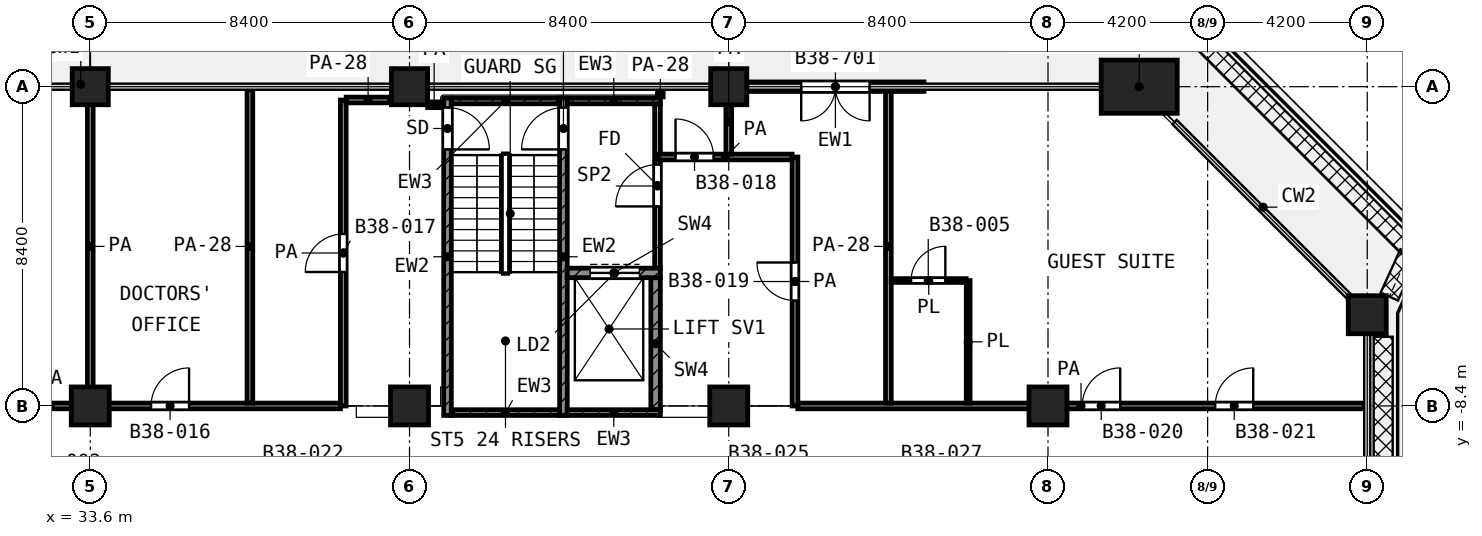
"""IFC4 building model, lengths in metres.
Left out: names, types, materials, properties, quantities, classifications, styles, units other than length and angle.
Written with IfcOpenShell. Run it as: python <this file> out.ifc"""

import sys

from ifc_helpers import new_model, si_unit, direction, frame, frame_2d, origin, origin_2d, place, context, subcontext, project, spatial, rectangle, extrude, element, fill, save


model = new_model("IFC4")
c1 = context("Model", 3, precision=1e-05, world=origin(), true_north=direction((0.0, 1.0)))
c2 = subcontext(c1, "Body", "Model", "MODEL_VIEW")
j1 = project(units=[si_unit("LENGTHUNIT", "METRE"), si_unit("PLANEANGLEUNIT", "RADIAN")], contexts=[c1])
p1 = place(None, origin())
s1 = spatial("IfcSite", under=j1, at=p1, CompositionType="ELEMENT")
p2 = place(p1, origin())
s2 = spatial("IfcBuilding", under=s1, at=p2, CompositionType="ELEMENT")
p3 = place(p2, frame((0.0, 0.0, 166.8)))
s3 = spatial("IfcBuildingStorey", under=s2, at=p3, CompositionType="ELEMENT", Elevation=166.8)
for number, where, z_axis, x_axis in (
    (1, (33.6, 0.0, 0.0), (0.0, 0.0, 1.0), (1.0, 0.0, 0.0)),
    (2, (42.0, 0.0, 0.0), (0.0, 0.0, 1.0), (1.0, 0.0, 0.0)),
    (3, (50.4, 0.0, 0.0), (0.0, 0.0, 1.0), (1.0, 0.0, 0.0)),
):
    element("IfcColumn", number, at=place(p3, frame(where, z_axis=z_axis, x_axis=x_axis)), inside=s3, PredefinedType="COLUMN", context=c2, shape_type="SweptSolid", body=[
        extrude(rectangle(XDim=0.95, YDim=0.95, at=origin_2d()), origin(), (0.0, 0.0, 1.0), 4.2),
    ])
p4 = place(p3, frame((61.2, 0.0, 0.0), z_axis=(0.0, 0.0, 1.0), x_axis=(1.0, 0.0, 0.0)))
e4 = element("IfcColumn", 4, at=p4, inside=s3, PredefinedType="COLUMN", context=c2, shape_type="SweptSolid", body=[
    extrude(rectangle(XDim=2.0, YDim=1.4, at=origin_2d()), origin(), (0.0, 0.0, 1.0), 4.2),
])
for number, where, z_axis, x_axis in (
    (5, (67.2, -6.0, 0.0), (0.0, 0.0, 1.0), (1.0, 0.0, 0.0)),
    (6, (33.6, -8.4, 0.0), (0.0, 0.0, 1.0), (1.0, 0.0, 0.0)),
    (7, (42.0, -8.4, 0.0), (0.0, 0.0, 1.0), (1.0, 0.0, 0.0)),
    (8, (50.4, -8.4, 0.0), (0.0, 0.0, 1.0), (1.0, 0.0, 0.0)),
    (9, (58.8, -8.4, 0.0), (0.0, 0.0, 1.0), (1.0, 0.0, 0.0)),
):
    element("IfcColumn", number, at=place(p3, frame(where, z_axis=z_axis, x_axis=x_axis)), inside=s3, PredefinedType="COLUMN", context=c2, shape_type="SweptSolid", body=[
        extrude(rectangle(XDim=1.0, YDim=1.0, at=origin_2d()), origin(), (0.0, 0.0, 1.0), 4.2),
    ])
p5 = place(p3, frame((55.538, 0.0, 0.0), z_axis=(0.0, 0.0, 1.0), x_axis=(-1.0, 0.0, 0.0)))
e10 = element("IfcWall", 10, at=p5, inside=s3, PredefinedType="SOLIDWALL", context=c2, shape_type="SweptSolid", body=[
    extrude(rectangle(XDim=4.663, YDim=0.25, at=frame_2d((2.331, 0.0))), origin(), (0.0, 0.0, 1.0), 2.58),
])
p6 = place(p5, frame((1.431, 0.0, 0.0)))
e11 = element("IfcOpeningElement", 11, at=p6, cuts=e10, PredefinedType="OPENING", context=c2, shape_type="SweptSolid", body=[
    extrude(rectangle(XDim=1.8, YDim=2.1, at=frame_2d((0.9, 1.05))), frame((0.0, 0.135, 0.0), z_axis=(0.0, -1.0, 0.0), x_axis=(1.0, 0.0, 0.0)), (0.0, 0.0, 1.0), 0.27),
])
p7 = place(p3, frame((43.0, -8.65, 0.0), z_axis=(0.0, 0.0, 1.0), x_axis=(0.0, 1.0, 0.0)))
e12 = element("IfcWall", 12, at=p7, inside=s3, PredefinedType="SHEAR", context=c2, shape_type="SweptSolid", body=[
    extrude(rectangle(XDim=8.35, YDim=0.2, at=frame_2d((4.175, 0.0))), origin(), (0.0, 0.0, 1.0), 3.6),
])
p8 = place(p7, frame((7.0, 0.0, 0.0)))
e13 = element("IfcOpeningElement", 13, at=p8, cuts=e12, PredefinedType="OPENING", context=c2, shape_type="SweptSolid", body=[
    extrude(rectangle(XDim=1.1, YDim=2.1, at=frame_2d((0.55, 1.05))), frame((0.0, 0.11, 0.0), z_axis=(0.0, -1.0, 0.0), x_axis=(1.0, 0.0, 0.0)), (0.0, 0.0, 1.0), 0.22),
])
p9 = place(p3, frame((46.05, -8.65, 0.0), z_axis=(0.0, 0.0, 1.0), x_axis=(0.0, 1.0, 0.0)))
e14 = element("IfcWall", 14, at=p9, inside=s3, PredefinedType="SHEAR", context=c2, shape_type="SweptSolid", body=[
    extrude(rectangle(XDim=8.35, YDim=0.2, at=frame_2d((4.175, 0.0))), origin(), (0.0, 0.0, 1.0), 3.6),
])
p10 = place(p9, frame((7.0, 0.0, 0.0)))
e15 = element("IfcOpeningElement", 15, at=p10, cuts=e14, PredefinedType="OPENING", context=c2, shape_type="SweptSolid", body=[
    extrude(rectangle(XDim=1.1, YDim=2.1, at=frame_2d((0.55, 1.05))), frame((0.0, 0.11, 0.0), z_axis=(0.0, -1.0, 0.0), x_axis=(1.0, 0.0, 0.0)), (0.0, 0.0, 1.0), 0.22),
])
p11 = place(p3, frame((43.1, -0.375, 0.0), z_axis=(0.0, 0.0, 1.0), x_axis=(1.0, 0.0, 0.0)))
e16 = element("IfcWall", 16, at=p11, inside=s3, PredefinedType="SHEAR", context=c2, shape_type="SweptSolid", body=[
    extrude(rectangle(XDim=2.85, YDim=0.15, at=frame_2d((1.425, 0.0))), origin(), (0.0, 0.0, 1.0), 3.6),
])
p12 = place(p3, frame((46.15, -0.375, 0.0), z_axis=(0.0, 0.0, 1.0), x_axis=(1.0, 0.0, 0.0)))
e17 = element("IfcWall", 17, at=p12, inside=s3, PredefinedType="SHEAR", context=c2, shape_type="SweptSolid", body=[
    extrude(rectangle(XDim=2.45, YDim=0.15, at=frame_2d((1.225, 0.0))), origin(), (0.0, 0.0, 1.0), 3.6),
])
p13 = place(p3, frame((43.1, -8.575, 0.0), z_axis=(0.0, 0.0, 1.0), x_axis=(1.0, 0.0, 0.0)))
e18 = element("IfcWall", 18, at=p13, inside=s3, PredefinedType="SHEAR", context=c2, shape_type="SweptSolid", body=[
    extrude(rectangle(XDim=2.85, YDim=0.15, at=frame_2d((1.425, 0.0))), origin(), (0.0, 0.0, 1.0), 3.6),
])
p14 = place(p3, frame((46.15, -8.575, 0.0), z_axis=(0.0, 0.0, 1.0), x_axis=(1.0, 0.0, 0.0)))
e19 = element("IfcWall", 19, at=p14, inside=s3, PredefinedType="SHEAR", context=c2, shape_type="SweptSolid", body=[
    extrude(rectangle(XDim=2.45, YDim=0.15, at=frame_2d((1.225, 0.0))), origin(), (0.0, 0.0, 1.0), 3.6),
])
p15 = place(p3, frame((46.15, -4.9, 0.0), z_axis=(0.0, 0.0, 1.0), x_axis=(1.0, 0.0, 0.0)))
e20 = element("IfcWall", 20, at=p15, inside=s3, PredefinedType="SHEAR", context=c2, shape_type="SweptSolid", body=[
    extrude(rectangle(XDim=2.45, YDim=0.25, at=frame_2d((1.225, 0.0))), origin(), (0.0, 0.0, 1.0), 3.6),
])
p16 = place(p15, frame((0.6, 0.0, 0.0)))
e21 = element("IfcOpeningElement", 21, at=p16, cuts=e20, PredefinedType="OPENING", context=c2, shape_type="SweptSolid", body=[
    extrude(rectangle(XDim=1.3, YDim=2.1, at=frame_2d((0.65, 1.05))), frame((0.0, 0.135, 0.0), z_axis=(0.0, -1.0, 0.0), x_axis=(1.0, 0.0, 0.0)), (0.0, 0.0, 1.0), 0.27),
])
p17 = place(p3, frame((48.475, -8.5, 0.0), z_axis=(0.0, 0.0, 1.0), x_axis=(0.0, 1.0, 0.0)))
e22 = element("IfcWall", 22, at=p17, inside=s3, PredefinedType="SHEAR", context=c2, shape_type="SweptSolid", body=[
    extrude(rectangle(XDim=3.475, YDim=0.25, at=frame_2d((1.738, 0.0))), origin(), (0.0, 0.0, 1.0), 3.6),
])
p18 = place(p3, frame((48.525, -4.775, 0.0), z_axis=(0.0, 0.0, 1.0), x_axis=(0.0, 1.0, 0.0)))
e23 = element("IfcWall", 23, at=p18, inside=s3, PredefinedType="PARTITIONING", context=c2, shape_type="SweptSolid", body=[
    extrude(rectangle(XDim=4.325, YDim=0.15, at=frame_2d((2.163, 0.0))), origin(), (0.0, 0.0, 1.0), 3.6),
])
p19 = place(p18, frame((1.625, 0.0, 0.0)))
e24 = element("IfcOpeningElement", 24, at=p19, cuts=e23, PredefinedType="OPENING", context=c2, shape_type="SweptSolid", body=[
    extrude(rectangle(XDim=1.1, YDim=2.1, at=frame_2d((0.55, 1.05))), frame((0.0, 0.085, 0.0), z_axis=(0.0, -1.0, 0.0), x_axis=(1.0, 0.0, 0.0)), (0.0, 0.0, 1.0), 0.17),
])
p20 = place(p3, frame((54.675, -5.1, 0.0), z_axis=(0.0, 0.0, 1.0), x_axis=(1.0, 0.0, 0.0)))
e25 = element("IfcWall", 25, at=p20, inside=s3, PredefinedType="PARTITIONING", context=c2, shape_type="SweptSolid", body=[
    extrude(rectangle(XDim=1.973, YDim=0.1, at=frame_2d((0.986, 0.0))), origin(), (0.0, 0.0, 1.0), 3.6),
])
p21 = place(p20, frame((0.524, 0.0, 0.0)))
e26 = element("IfcOpeningElement", 26, at=p21, cuts=e25, PredefinedType="OPENING", context=c2, shape_type="SweptSolid", body=[
    extrude(rectangle(XDim=0.9, YDim=2.1, at=frame_2d((0.45, 1.05))), frame((0.0, 0.06, 0.0), z_axis=(0.0, -1.0, 0.0), x_axis=(1.0, 0.0, 0.0)), (0.0, 0.0, 1.0), 0.12),
])
p22 = place(p3, frame((56.7, -8.325, 0.0), z_axis=(0.0, 0.0, 1.0), x_axis=(0.0, 1.0, 0.0)))
e27 = element("IfcWall", 27, at=p22, inside=s3, PredefinedType="PARTITIONING", context=c2, shape_type="SweptSolid", body=[
    extrude(rectangle(XDim=3.224, YDim=0.1, at=frame_2d((1.612, 0.0))), origin(), (0.0, 0.0, 1.0), 3.6),
])
p23 = place(p3, frame((24.9, -8.4, 0.0), z_axis=(0.0, 0.0, 1.0), x_axis=(1.0, 0.0, 0.0)))
e28 = element("IfcWall", 28, at=p23, inside=s3, PredefinedType="PARTITIONING", context=c2, shape_type="SweptSolid", body=[
    extrude(rectangle(XDim=15.282, YDim=0.15, at=frame_2d((7.641, 0.0))), origin(), (0.0, 0.0, 1.0), 3.6),
])
p24 = place(p23, frame((3.9, 0.0, 0.0)))
e29 = element("IfcOpeningElement", 29, at=p24, cuts=e28, PredefinedType="OPENING", context=c2, shape_type="SweptSolid", body=[
    extrude(rectangle(XDim=1.2, YDim=2.1, at=frame_2d((0.6, 1.05))), frame((0.0, 0.085, 0.0), z_axis=(0.0, -1.0, 0.0), x_axis=(1.0, 0.0, 0.0)), (0.0, 0.0, 1.0), 0.17),
])
p25 = place(p23, frame((10.3, 0.0, 0.0)))
e30 = element("IfcOpeningElement", 30, at=p25, cuts=e28, PredefinedType="OPENING", context=c2, shape_type="SweptSolid", body=[
    extrude(rectangle(XDim=1.0, YDim=2.1, at=frame_2d((0.5, 1.05))), frame((0.0, 0.085, 0.0), z_axis=(0.0, -1.0, 0.0), x_axis=(1.0, 0.0, 0.0)), (0.0, 0.0, 1.0), 0.17),
])
p26 = place(p3, frame((52.218, -8.4, 0.0), z_axis=(0.0, 0.0, 1.0), x_axis=(1.0, 0.0, 0.0)))
e31 = element("IfcWall", 31, at=p26, inside=s3, PredefinedType="PARTITIONING", context=c2, shape_type="SweptSolid", body=[
    extrude(rectangle(XDim=14.902, YDim=0.15, at=frame_2d((7.451, 0.0))), origin(), (0.0, 0.0, 1.0), 3.6),
])
p27 = place(p26, frame((7.482, 0.0, 0.0)))
e32 = element("IfcOpeningElement", 32, at=p27, cuts=e31, PredefinedType="OPENING", context=c2, shape_type="SweptSolid", body=[
    extrude(rectangle(XDim=1.0, YDim=2.1, at=frame_2d((0.5, 1.05))), frame((0.0, 0.085, 0.0), z_axis=(0.0, -1.0, 0.0), x_axis=(1.0, 0.0, 0.0)), (0.0, 0.0, 1.0), 0.17),
])
p28 = place(p26, frame((10.982, 0.0, 0.0)))
e33 = element("IfcOpeningElement", 33, at=p28, cuts=e31, PredefinedType="OPENING", context=c2, shape_type="SweptSolid", body=[
    extrude(rectangle(XDim=1.0, YDim=2.1, at=frame_2d((0.5, 1.05))), frame((0.0, 0.085, 0.0), z_axis=(0.0, -1.0, 0.0), x_axis=(1.0, 0.0, 0.0)), (0.0, 0.0, 1.0), 0.17),
])
p29 = place(p3, frame((48.55, -1.85, 0.0), z_axis=(0.0, 0.0, 1.0), x_axis=(1.0, 0.0, 0.0)))
e34 = element("IfcWall", 34, at=p29, inside=s3, PredefinedType="PARTITIONING", context=c2, shape_type="SweptSolid", body=[
    extrude(rectangle(XDim=3.516, YDim=0.15, at=frame_2d((1.758, 0.0))), origin(), (0.0, 0.0, 1.0), 3.6),
])
p30 = place(p29, frame((0.45, 0.0, 0.0)))
e35 = element("IfcOpeningElement", 35, at=p30, cuts=e34, PredefinedType="OPENING", context=c2, shape_type="SweptSolid", body=[
    extrude(rectangle(XDim=1.0, YDim=2.1, at=frame_2d((0.5, 1.05))), frame((0.0, 0.085, 0.0), z_axis=(0.0, -1.0, 0.0), x_axis=(1.0, 0.0, 0.0)), (0.0, 0.0, 1.0), 0.17),
])
p31 = place(p3, frame((42.477, -0.475, 0.0), z_axis=(0.0, 0.0, 1.0), x_axis=(1.0, 0.0, 0.0)))
e36 = element("IfcWall", 36, at=p31, inside=s3, PredefinedType="PARTITIONING", context=c2, shape_type="SweptSolid", body=[
    extrude(rectangle(XDim=0.343, YDim=0.15, at=frame_2d((0.171, 0.0))), origin(), (0.0, 0.0, 1.0), 3.6),
])
p32 = place(p3, frame((40.333, -0.35, 0.0), z_axis=(0.0, 0.0, 1.0), x_axis=(1.0, 0.0, 0.0)))
e37 = element("IfcWall", 37, at=p32, inside=s3, PredefinedType="PARTITIONING", context=c2, shape_type="SweptSolid", body=[
    extrude(rectangle(XDim=1.155, YDim=0.15, at=frame_2d((0.578, 0.0))), origin(), (0.0, 0.0, 1.0), 2.7),
])
p33 = place(p3, frame((33.6, -8.325, 0.0), z_axis=(0.0, 0.0, 1.0), x_axis=(0.0, 1.0, 0.0)))
e38 = element("IfcWall", 38, at=p33, inside=s3, PredefinedType="PARTITIONING", context=c2, shape_type="SweptSolid", body=[
    extrude(rectangle(XDim=8.245, YDim=0.15, at=frame_2d((4.123, 0.0))), origin(), (0.0, 0.0, 1.0), 3.6),
])
p34 = place(p3, frame((37.8, -8.325, 0.0), z_axis=(0.0, 0.0, 1.0), x_axis=(0.0, 1.0, 0.0)))
e39 = element("IfcWall", 39, at=p34, inside=s3, PredefinedType="PARTITIONING", context=c2, shape_type="SweptSolid", body=[
    extrude(rectangle(XDim=8.245, YDim=0.15, at=frame_2d((4.123, 0.0))), origin(), (0.0, 0.0, 1.0), 2.7),
])
p35 = place(p3, frame((40.257, -8.4, 0.0), z_axis=(0.0, 0.0, 1.0), x_axis=(0.0, 1.0, 0.0)))
e40 = element("IfcWall", 40, at=p35, inside=s3, PredefinedType="PARTITIONING", context=c2, shape_type="SweptSolid", body=[
    extrude(rectangle(XDim=8.048, YDim=0.15, at=frame_2d((4.024, 0.0))), origin(), (0.0, 0.0, 1.0), 3.6),
])
p36 = place(p35, frame((3.524, 0.0, 0.0)))
e41 = element("IfcOpeningElement", 41, at=p36, cuts=e40, PredefinedType="OPENING", context=c2, shape_type="SweptSolid", body=[
    extrude(rectangle(XDim=1.0, YDim=2.1, at=frame_2d((0.5, 1.05))), frame((0.0, 0.085, 0.0), z_axis=(0.0, -1.0, 0.0), x_axis=(1.0, 0.0, 0.0)), (0.0, 0.0, 1.0), 0.17),
])
p37 = place(p3, frame((48.6, -0.27, 0.0), z_axis=(0.0, 0.0, 1.0), x_axis=(0.0, 1.0, 0.0)))
e42 = element("IfcWall", 42, at=p37, inside=s3, PredefinedType="PARTITIONING", context=c2, shape_type="SweptSolid", body=[
    extrude(rectangle(XDim=0.19, YDim=0.15, at=frame_2d((0.095, 0.0))), origin(), (0.0, 0.0, 1.0), 2.7),
])
p38 = place(p3, frame((50.4, -1.775, 0.0), z_axis=(0.0, 0.0, 1.0), x_axis=(0.0, 1.0, 0.0)))
e43 = element("IfcWall", 43, at=p38, inside=s3, PredefinedType="PARTITIONING", context=c2, shape_type="SweptSolid", body=[
    extrude(rectangle(XDim=1.695, YDim=0.15, at=frame_2d((0.847, 0.0))), origin(), (0.0, 0.0, 1.0), 3.6),
])
p39 = place(p3, frame((52.143, -8.4, 0.0), z_axis=(0.0, 0.0, 1.0), x_axis=(0.0, 1.0, 0.0)))
e44 = element("IfcWall", 44, at=p39, inside=s3, PredefinedType="PARTITIONING", context=c2, shape_type="SweptSolid", body=[
    extrude(rectangle(XDim=6.549, YDim=0.15, at=frame_2d((3.274, 0.0))), origin(), (0.0, 0.0, 1.0), 3.6),
])
p40 = place(p39, frame((2.774, 0.0, 0.0)))
e45 = element("IfcOpeningElement", 45, at=p40, cuts=e44, PredefinedType="OPENING", context=c2, shape_type="SweptSolid", body=[
    extrude(rectangle(XDim=1.0, YDim=2.1, at=frame_2d((0.5, 1.05))), frame((0.0, 0.085, 0.0), z_axis=(0.0, -1.0, 0.0), x_axis=(1.0, 0.0, 0.0)), (0.0, 0.0, 1.0), 0.17),
])
p41 = place(p3, frame((54.6, -8.325, 0.0), z_axis=(0.0, 0.0, 1.0), x_axis=(0.0, 1.0, 0.0)))
e46 = element("IfcWall", 46, at=p41, inside=s3, PredefinedType="PARTITIONING", context=c2, shape_type="SweptSolid", body=[
    extrude(rectangle(XDim=8.245, YDim=0.15, at=frame_2d((4.123, 0.0))), origin(), (0.0, 0.0, 1.0), 2.7),
])
p42 = place(p6, origin())
e47 = element("IfcDoor", 47, at=p42, inside=s3, OperationType="DOUBLE_DOOR_SINGLE_SWING", PredefinedType="DOOR", context=c2, shape_type="SweptSolid", body=[
    extrude(rectangle(XDim=1.8, YDim=2.1, at=frame_2d((0.9, 1.05))), frame((0.0, 0.025, 0.0), z_axis=(0.0, -1.0, 0.0), x_axis=(1.0, 0.0, 0.0)), (0.0, 0.0, 1.0), 0.05),
])
fill(e11, e47)
p43 = place(p8, frame((1.1, 0.0, 0.0), z_axis=(0.0, 0.0, 1.0), x_axis=(-1.0, 0.0, 0.0)))
e48 = element("IfcDoor", 48, at=p43, inside=s3, OperationType="SINGLE_SWING_LEFT", PredefinedType="DOOR", context=c2, shape_type="SweptSolid", body=[
    extrude(rectangle(XDim=1.1, YDim=2.1, at=frame_2d((0.55, 1.05))), frame((0.0, 0.025, 0.0), z_axis=(0.0, -1.0, 0.0), x_axis=(1.0, 0.0, 0.0)), (0.0, 0.0, 1.0), 0.05),
])
fill(e13, e48)
p44 = place(p10, origin())
e49 = element("IfcDoor", 49, at=p44, inside=s3, OperationType="SINGLE_SWING_LEFT", PredefinedType="DOOR", context=c2, shape_type="SweptSolid", body=[
    extrude(rectangle(XDim=1.1, YDim=2.1, at=frame_2d((0.55, 1.05))), frame((0.0, 0.025, 0.0), z_axis=(0.0, -1.0, 0.0), x_axis=(1.0, 0.0, 0.0)), (0.0, 0.0, 1.0), 0.05),
])
fill(e15, e49)
p45 = place(p16, origin())
e50 = element("IfcDoor", 50, at=p45, inside=s3, OperationType="DOUBLE_DOOR_SLIDING", PredefinedType="DOOR", context=c2, shape_type="SweptSolid", body=[
    extrude(rectangle(XDim=1.3, YDim=2.1, at=frame_2d((0.65, 1.05))), frame((0.0, 0.025, 0.0), z_axis=(0.0, -1.0, 0.0), x_axis=(1.0, 0.0, 0.0)), (0.0, 0.0, 1.0), 0.05),
])
fill(e21, e50)
p46 = place(p19, origin())
e51 = element("IfcDoor", 51, at=p46, inside=s3, OperationType="SINGLE_SWING_LEFT", PredefinedType="DOOR", context=c2, shape_type="SweptSolid", body=[
    extrude(rectangle(XDim=1.1, YDim=2.1, at=frame_2d((0.55, 1.05))), frame((0.0, 0.025, 0.0), z_axis=(0.0, -1.0, 0.0), x_axis=(1.0, 0.0, 0.0)), (0.0, 0.0, 1.0), 0.05),
])
fill(e24, e51)
p47 = place(p25, origin())
e52 = element("IfcDoor", 52, at=p47, inside=s3, OperationType="SINGLE_SWING_RIGHT", PredefinedType="DOOR", context=c2, shape_type="SweptSolid", body=[
    extrude(rectangle(XDim=1.0, YDim=2.1, at=frame_2d((0.5, 1.05))), frame((0.0, 0.025, 0.0), z_axis=(0.0, -1.0, 0.0), x_axis=(1.0, 0.0, 0.0)), (0.0, 0.0, 1.0), 0.05),
])
fill(e30, e52)
p48 = place(p36, origin())
e53 = element("IfcDoor", 53, at=p48, inside=s3, OperationType="SINGLE_SWING_LEFT", PredefinedType="DOOR", context=c2, shape_type="SweptSolid", body=[
    extrude(rectangle(XDim=1.0, YDim=2.1, at=frame_2d((0.5, 1.05))), frame((0.0, 0.025, 0.0), z_axis=(0.0, -1.0, 0.0), x_axis=(1.0, 0.0, 0.0)), (0.0, 0.0, 1.0), 0.05),
])
fill(e41, e53)
p49 = place(p30, origin())
e54 = element("IfcDoor", 54, at=p49, inside=s3, OperationType="SINGLE_SWING_LEFT", PredefinedType="DOOR", context=c2, shape_type="SweptSolid", body=[
    extrude(rectangle(XDim=1.0, YDim=2.1, at=frame_2d((0.5, 1.05))), frame((0.0, 0.025, 0.0), z_axis=(0.0, -1.0, 0.0), x_axis=(1.0, 0.0, 0.0)), (0.0, 0.0, 1.0), 0.05),
])
fill(e35, e54)
p50 = place(p40, origin())
e55 = element("IfcDoor", 55, at=p50, inside=s3, OperationType="SINGLE_SWING_RIGHT", PredefinedType="DOOR", context=c2, shape_type="SweptSolid", body=[
    extrude(rectangle(XDim=1.0, YDim=2.1, at=frame_2d((0.5, 1.05))), frame((0.0, 0.025, 0.0), z_axis=(0.0, -1.0, 0.0), x_axis=(1.0, 0.0, 0.0)), (0.0, 0.0, 1.0), 0.05),
])
fill(e45, e55)
p51 = place(p27, origin())
e56 = element("IfcDoor", 56, at=p51, inside=s3, OperationType="SINGLE_SWING_RIGHT", PredefinedType="DOOR", context=c2, shape_type="SweptSolid", body=[
    extrude(rectangle(XDim=1.0, YDim=2.1, at=frame_2d((0.5, 1.05))), frame((0.0, 0.025, 0.0), z_axis=(0.0, -1.0, 0.0), x_axis=(1.0, 0.0, 0.0)), (0.0, 0.0, 1.0), 0.05),
])
fill(e32, e56)
p52 = place(p28, origin())
e57 = element("IfcDoor", 57, at=p52, inside=s3, OperationType="SINGLE_SWING_RIGHT", PredefinedType="DOOR", context=c2, shape_type="SweptSolid", body=[
    extrude(rectangle(XDim=1.0, YDim=2.1, at=frame_2d((0.5, 1.05))), frame((0.0, 0.025, 0.0), z_axis=(0.0, -1.0, 0.0), x_axis=(1.0, 0.0, 0.0)), (0.0, 0.0, 1.0), 0.05),
])
fill(e33, e57)
p53 = place(p21, origin())
e58 = element("IfcDoor", 58, at=p53, inside=s3, OperationType="SINGLE_SWING_RIGHT", PredefinedType="DOOR", context=c2, shape_type="SweptSolid", body=[
    extrude(rectangle(XDim=0.9, YDim=2.1, at=frame_2d((0.45, 1.05))), frame((0.0, 0.025, 0.0), z_axis=(0.0, -1.0, 0.0), x_axis=(1.0, 0.0, 0.0)), (0.0, 0.0, 1.0), 0.05),
])
fill(e26, e58)
save(model, sys.argv[1])
